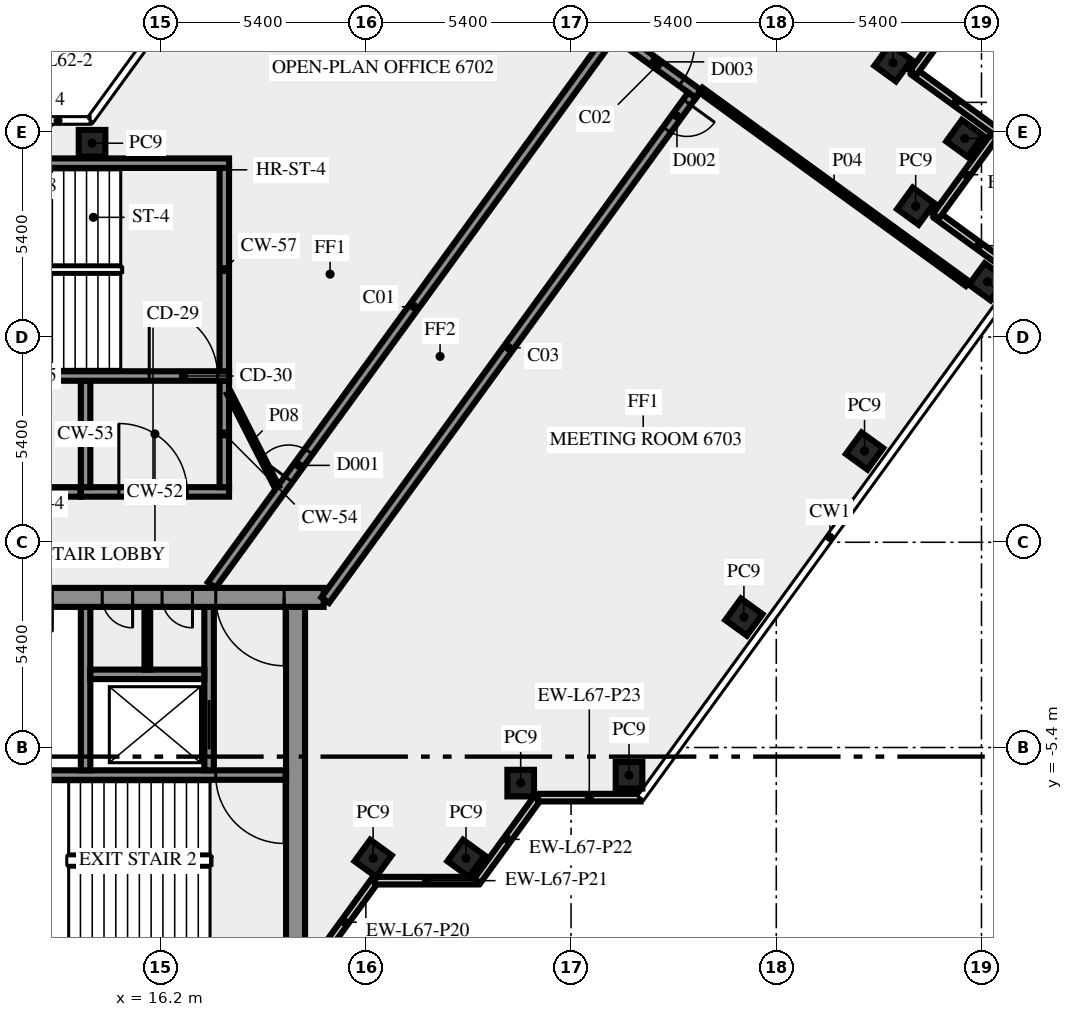
"""IFC4 building model, lengths in metres.
Left out: names, types, materials, properties, quantities, classifications, styles, units other than length and angle.
Written with IfcOpenShell. Run it as: python <this file> out.ifc"""

import sys

from ifc_helpers import new_model, si_unit, direction, frame, frame_2d, origin, origin_2d, place, context, subcontext, project, spatial, rectangle, extrude, element, fill, save


model = new_model("IFC4")
c1 = context("Model", 3, precision=1e-05, world=origin(), true_north=direction((0.0, 1.0)))
c2 = subcontext(c1, "Body", "Model", "MODEL_VIEW")
j1 = project(units=[si_unit("LENGTHUNIT", "METRE"), si_unit("PLANEANGLEUNIT", "RADIAN")], contexts=[c1])
p1 = place(None, origin())
s1 = spatial("IfcSite", under=j1, at=p1, CompositionType="ELEMENT")
p2 = place(p1, origin())
s2 = spatial("IfcBuilding", under=s1, at=p2, CompositionType="ELEMENT")
p3 = place(p2, frame((0.0, 0.0, 289.0)))
s3 = spatial("IfcBuildingStorey", under=s2, at=p3, CompositionType="ELEMENT", Elevation=289.0)
for number, where, z_axis, x_axis in (
    (1, (21.792, -8.315, 0.0), (0.0, 0.0, 1.0), (0.588, 0.809, 0.0)),
    (2, (24.235, -8.315, 0.0), (0.0, 0.0, 1.0), (0.588, 0.809, 0.0)),
    (3, (25.674, -6.337, 0.0), (0.0, 0.0, 1.0), (1.0, 0.0, 0.0)),
    (4, (28.525, -6.13, 0.0), (0.0, 0.0, 1.0), (1.0, 0.0, 0.0)),
    (5, (31.548, -1.969, 0.0), (0.0, 0.0, 1.0), (0.588, 0.809, 0.0)),
    (6, (34.722, 2.4, 0.0), (0.0, 0.0, 1.0), (0.588, 0.809, 0.0)),
    (7, (37.96, 6.855, 0.0), (0.0, 0.0, 1.0), (0.588, 0.809, 0.0)),
    (8, (36.068, 8.844, 0.0), (0.0, 0.0, 1.0), (0.588, 0.809, 0.0)),
    (9, (37.36, 10.625, 0.0), (0.0, 0.0, 1.0), (0.588, 0.809, 0.0)),
    (10, (35.471, 12.616, 0.0), (0.0, 0.0, 1.0), (-0.809, 0.588, 0.0)),
    (11, (14.395, 10.5, 0.0), (0.0, 0.0, 1.0), (-1.0, 0.0, 0.0)),
):
    element("IfcColumn", number, at=place(p3, frame(where, z_axis=z_axis, x_axis=x_axis)), inside=s3, PredefinedType="COLUMN", context=c2, shape_type="SweptSolid", body=[
        extrude(rectangle(XDim=0.7, YDim=0.7, at=origin_2d()), origin(), (0.0, 0.0, 1.0), 3.65),
    ])
p4 = place(p3, frame((20.253, -11.083, 0.0), z_axis=(0.0, 0.0, 1.0), x_axis=(0.587766567315, 0.809030569476, 0.0)))
e12 = element("IfcWall", 12, at=p4, inside=s3, PredefinedType="SOLIDWALL", context=c2, shape_type="SweptSolid", body=[
    extrude(rectangle(XDim=2.688, YDim=0.2, at=frame_2d((1.344, 0.0))), origin(), (0.0, 0.0, 1.0), 3.65),
])
p5 = place(p3, frame((21.843, -8.904, 0.0), z_axis=(0.0, 0.0, 1.0), x_axis=(1.0, 0.0, 0.0)))
e13 = element("IfcWall", 13, at=p5, inside=s3, PredefinedType="SOLIDWALL", context=c2, shape_type="SweptSolid", body=[
    extrude(rectangle(XDim=2.7, YDim=0.2, at=frame_2d((1.35, 0.0))), origin(), (0.0, 0.0, 1.0), 3.65),
])
p6 = place(p3, frame((24.533, -8.909, 0.0), z_axis=(0.0, 0.0, 1.0), x_axis=(0.587720002413, 0.809064397168, 0.0)))
e14 = element("IfcWall", 14, at=p6, inside=s3, PredefinedType="SOLIDWALL", context=c2, shape_type="SweptSolid", body=[
    extrude(rectangle(XDim=2.7, YDim=0.2, at=frame_2d((1.35, 0.0))), origin(), (0.0, 0.0, 1.0), 3.65),
])
for number, where, z_axis, x_axis in (
    (15, (26.13, -6.719, 0.0), (0.0, 0.0, 1.0), (1.0, 0.0, 0.0)),
    (16, (38.814, 7.01, 0.0), (0.0, 0.0, 1.0), (-0.809, 0.588, 0.0)),
    (17, (36.602, 8.58, 0.0), (0.0, 0.0, 1.0), (0.588, 0.809, 0.0)),
    (18, (38.216, 10.782, 0.0), (0.0, 0.0, 1.0), (-0.809, 0.588, 0.0)),
    (19, (36.005, 12.352, 0.0), (0.0, 0.0, 1.0), (0.588, 0.809, 0.0)),
):
    element("IfcWall", number, at=place(p3, frame(where, z_axis=z_axis, x_axis=x_axis)), inside=s3, PredefinedType="SOLIDWALL", context=c2, shape_type="SweptSolid", body=[
        extrude(rectangle(XDim=2.7, YDim=0.2, at=frame_2d((1.35, 0.0))), origin(), (0.0, 0.0, 1.0), 3.65),
    ])
p7 = place(p3, frame((19.75, -10.5, 0.0), z_axis=(0.0, 0.0, 1.0), x_axis=(0.0, 1.0, 0.0)))
e20 = element("IfcWall", 20, at=p7, inside=s3, PredefinedType="SHEAR", context=c2, shape_type="SweptSolid", body=[
    extrude(rectangle(XDim=8.8, YDim=0.5, at=frame_2d((4.4, 0.0))), origin(), (0.0, 0.0, 1.0), 3.65),
])
p8 = place(p3, frame((19.5, -6.125, 0.0), z_axis=(0.0, 0.0, 1.0), x_axis=(-1.0, 0.0, 0.0)))
e21 = element("IfcWall", 21, at=p8, inside=s3, PredefinedType="SHEAR", context=c2, shape_type="SweptSolid", body=[
    extrude(rectangle(XDim=8.05, YDim=0.25, at=frame_2d((4.025, 0.0))), origin(), (0.0, 0.0, 1.0), 3.65),
])
p9 = place(p8, frame((0.05, 0.0, 0.0)))
e22 = element("IfcOpeningElement", 22, at=p9, cuts=e21, PredefinedType="OPENING", context=c2, shape_type="SweptSolid", body=[
    extrude(rectangle(XDim=1.8, YDim=2.1, at=frame_2d((0.9, 1.05))), frame((0.0, 0.135, 0.0), z_axis=(0.0, -1.0, 0.0), x_axis=(1.0, 0.0, 0.0)), (0.0, 0.0, 1.0), 0.27),
])
p10 = place(p3, frame((14.225, -6.0, 0.0), z_axis=(0.0, 0.0, 1.0), x_axis=(0.0, 1.0, 0.0)))
e23 = element("IfcWall", 23, at=p10, inside=s3, PredefinedType="SHEAR", context=c2, shape_type="SweptSolid", body=[
    extrude(rectangle(XDim=4.3, YDim=0.25, at=frame_2d((2.15, 0.0))), origin(), (0.0, 0.0, 1.0), 3.65),
])
p11 = place(p3, frame((17.475, -6.0, 0.0), z_axis=(0.0, 0.0, 1.0), x_axis=(0.0, 1.0, 0.0)))
e24 = element("IfcWall", 24, at=p11, inside=s3, PredefinedType="SHEAR", context=c2, shape_type="SweptSolid", body=[
    extrude(rectangle(XDim=4.3, YDim=0.25, at=frame_2d((2.15, 0.0))), origin(), (0.0, 0.0, 1.0), 3.65),
])
p12 = place(p11, frame((0.55, 0.0, 0.0)))
e25 = element("IfcOpeningElement", 25, at=p12, cuts=e24, PredefinedType="OPENING", context=c2, shape_type="SweptSolid", body=[
    extrude(rectangle(XDim=1.3, YDim=2.1, at=frame_2d((0.65, 1.05))), frame((0.0, 0.135, 0.0), z_axis=(0.0, -1.0, 0.0), x_axis=(1.0, 0.0, 0.0)), (0.0, 0.0, 1.0), 0.27),
])
p13 = place(p3, frame((14.35, -3.475, 0.0), z_axis=(0.0, 0.0, 1.0), x_axis=(1.0, 0.0, 0.0)))
e26 = element("IfcWall", 26, at=p13, inside=s3, PredefinedType="SHEAR", context=c2, shape_type="SweptSolid", body=[
    extrude(rectangle(XDim=3.0, YDim=0.25, at=frame_2d((1.5, 0.0))), origin(), (0.0, 0.0, 1.0), 3.65),
])
p14 = place(p3, frame((15.85, -3.35, 0.0), z_axis=(0.0, 0.0, 1.0), x_axis=(0.0, 1.0, 0.0)))
e27 = element("IfcWall", 27, at=p14, inside=s3, PredefinedType="PARTITIONING", context=c2, shape_type="SweptSolid", body=[
    extrude(rectangle(XDim=1.65, YDim=0.15, at=frame_2d((0.825, 0.0))), origin(), (0.0, 0.0, 1.0), 3.65),
])
p15 = place(p3, frame((20.49, -1.45, 0.0), z_axis=(0.0, 0.0, 1.0), x_axis=(-1.0, 0.0, 0.0)))
e28 = element("IfcWall", 28, at=p15, inside=s3, PredefinedType="SHEAR", context=c2, shape_type="SweptSolid", body=[
    extrude(rectangle(XDim=40.98, YDim=0.5, at=frame_2d((20.49, 0.0))), origin(), (0.0, 0.0, 1.0), 3.65),
])
p16 = place(p15, frame((38.14, 0.0, 0.0)))
e29 = element("IfcOpeningElement", 29, at=p16, cuts=e28, PredefinedType="OPENING", context=c2, shape_type="SweptSolid", body=[
    extrude(rectangle(XDim=1.8, YDim=2.1, at=frame_2d((0.9, 1.05))), frame((0.0, 0.26, 0.0), z_axis=(0.0, -1.0, 0.0), x_axis=(1.0, 0.0, 0.0)), (0.0, 0.0, 1.0), 0.52),
])
p17 = place(p15, frame((35.89, 0.0, 0.0)))
e30 = element("IfcOpeningElement", 30, at=p17, cuts=e28, PredefinedType="OPENING", context=c2, shape_type="SweptSolid", body=[
    extrude(rectangle(XDim=0.9, YDim=2.1, at=frame_2d((0.45, 1.05))), frame((0.0, 0.26, 0.0), z_axis=(0.0, -1.0, 0.0), x_axis=(1.0, 0.0, 0.0)), (0.0, 0.0, 1.0), 0.52),
])
p18 = place(p15, frame((32.94, 0.0, 0.0)))
e31 = element("IfcOpeningElement", 31, at=p18, cuts=e28, PredefinedType="OPENING", context=c2, shape_type="SweptSolid", body=[
    extrude(rectangle(XDim=0.9, YDim=2.1, at=frame_2d((0.45, 1.05))), frame((0.0, 0.26, 0.0), z_axis=(0.0, -1.0, 0.0), x_axis=(1.0, 0.0, 0.0)), (0.0, 0.0, 1.0), 0.52),
])
p19 = place(p15, frame((31.015, 0.0, 0.0)))
e32 = element("IfcOpeningElement", 32, at=p19, cuts=e28, PredefinedType="OPENING", context=c2, shape_type="SweptSolid", body=[
    extrude(rectangle(XDim=0.8, YDim=2.1, at=frame_2d((0.4, 1.05))), frame((0.0, 0.26, 0.0), z_axis=(0.0, -1.0, 0.0), x_axis=(1.0, 0.0, 0.0)), (0.0, 0.0, 1.0), 0.52),
])
p20 = place(p15, frame((24.765, 0.0, 0.0)))
e33 = element("IfcOpeningElement", 33, at=p20, cuts=e28, PredefinedType="OPENING", context=c2, shape_type="SweptSolid", body=[
    extrude(rectangle(XDim=0.8, YDim=2.1, at=frame_2d((0.4, 1.05))), frame((0.0, 0.26, 0.0), z_axis=(0.0, -1.0, 0.0), x_axis=(1.0, 0.0, 0.0)), (0.0, 0.0, 1.0), 0.52),
])
p21 = place(p15, frame((21.765, 0.0, 0.0)))
e34 = element("IfcOpeningElement", 34, at=p21, cuts=e28, PredefinedType="OPENING", context=c2, shape_type="SweptSolid", body=[
    extrude(rectangle(XDim=2.0, YDim=2.1, at=frame_2d((1.0, 1.05))), frame((0.0, 0.26, 0.0), z_axis=(0.0, -1.0, 0.0), x_axis=(1.0, 0.0, 0.0)), (0.0, 0.0, 1.0), 0.52),
])
p22 = place(p15, frame((15.202, 0.0, 0.0)))
e35 = element("IfcOpeningElement", 35, at=p22, cuts=e28, PredefinedType="OPENING", context=c2, shape_type="SweptSolid", body=[
    extrude(rectangle(XDim=0.9, YDim=2.1, at=frame_2d((0.45, 1.05))), frame((0.0, 0.26, 0.0), z_axis=(0.0, -1.0, 0.0), x_axis=(1.0, 0.0, 0.0)), (0.0, 0.0, 1.0), 0.52),
])
p23 = place(p15, frame((13.54, 0.0, 0.0)))
e36 = element("IfcOpeningElement", 36, at=p23, cuts=e28, PredefinedType="OPENING", context=c2, shape_type="SweptSolid", body=[
    extrude(rectangle(XDim=0.9, YDim=2.1, at=frame_2d((0.45, 1.05))), frame((0.0, 0.26, 0.0), z_axis=(0.0, -1.0, 0.0), x_axis=(1.0, 0.0, 0.0)), (0.0, 0.0, 1.0), 0.52),
])
p24 = place(p15, frame((11.64, 0.0, 0.0)))
e37 = element("IfcOpeningElement", 37, at=p24, cuts=e28, PredefinedType="OPENING", context=c2, shape_type="SweptSolid", body=[
    extrude(rectangle(XDim=0.9, YDim=2.1, at=frame_2d((0.45, 1.05))), frame((0.0, 0.26, 0.0), z_axis=(0.0, -1.0, 0.0), x_axis=(1.0, 0.0, 0.0)), (0.0, 0.0, 1.0), 0.52),
])
p25 = place(p15, frame((9.577, 0.0, 0.0)))
e38 = element("IfcOpeningElement", 38, at=p25, cuts=e28, PredefinedType="OPENING", context=c2, shape_type="SweptSolid", body=[
    extrude(rectangle(XDim=0.9, YDim=2.1, at=frame_2d((0.45, 1.05))), frame((0.0, 0.26, 0.0), z_axis=(0.0, -1.0, 0.0), x_axis=(1.0, 0.0, 0.0)), (0.0, 0.0, 1.0), 0.52),
])
p26 = place(p15, frame((7.14, 0.0, 0.0)))
e39 = element("IfcOpeningElement", 39, at=p26, cuts=e28, PredefinedType="OPENING", context=c2, shape_type="SweptSolid", body=[
    extrude(rectangle(XDim=0.9, YDim=2.1, at=frame_2d((0.45, 1.05))), frame((0.0, 0.26, 0.0), z_axis=(0.0, -1.0, 0.0), x_axis=(1.0, 0.0, 0.0)), (0.0, 0.0, 1.0), 0.52),
])
p27 = place(p15, frame((5.028, 0.0, 0.0)))
e40 = element("IfcOpeningElement", 40, at=p27, cuts=e28, PredefinedType="OPENING", context=c2, shape_type="SweptSolid", body=[
    extrude(rectangle(XDim=0.8, YDim=2.1, at=frame_2d((0.4, 1.05))), frame((0.0, 0.26, 0.0), z_axis=(0.0, -1.0, 0.0), x_axis=(1.0, 0.0, 0.0)), (0.0, 0.0, 1.0), 0.52),
])
p28 = place(p15, frame((3.452, 0.0, 0.0)))
e41 = element("IfcOpeningElement", 41, at=p28, cuts=e28, PredefinedType="OPENING", context=c2, shape_type="SweptSolid", body=[
    extrude(rectangle(XDim=0.8, YDim=2.1, at=frame_2d((0.4, 1.05))), frame((0.0, 0.26, 0.0), z_axis=(0.0, -1.0, 0.0), x_axis=(1.0, 0.0, 0.0)), (0.0, 0.0, 1.0), 0.52),
])
p29 = place(p15, frame((1.04, 0.0, 0.0)))
e42 = element("IfcOpeningElement", 42, at=p29, cuts=e28, PredefinedType="OPENING", context=c2, shape_type="SweptSolid", body=[
    extrude(rectangle(XDim=1.8, YDim=2.1, at=frame_2d((0.9, 1.05))), frame((0.0, 0.26, 0.0), z_axis=(0.0, -1.0, 0.0), x_axis=(1.0, 0.0, 0.0)), (0.0, 0.0, 1.0), 0.52),
])
p30 = place(p3, frame((14.1, 1.325, 0.0), z_axis=(0.0, 0.0, 1.0), x_axis=(1.0, 0.0, 0.0)))
e43 = element("IfcWall", 43, at=p30, inside=s3, PredefinedType="SHEAR", context=c2, shape_type="SweptSolid", body=[
    extrude(rectangle(XDim=3.9, YDim=0.25, at=frame_2d((1.95, 0.0))), origin(), (0.0, 0.0, 1.0), 3.65),
])
p31 = place(p30, frame((1.0, 0.0, 0.0)))
e44 = element("IfcOpeningElement", 44, at=p31, cuts=e43, PredefinedType="OPENING", context=c2, shape_type="SweptSolid", body=[
    extrude(rectangle(XDim=1.8, YDim=2.1, at=frame_2d((0.9, 1.05))), frame((0.0, 0.135, 0.0), z_axis=(0.0, -1.0, 0.0), x_axis=(1.0, 0.0, 0.0)), (0.0, 0.0, 1.0), 0.27),
])
for number, where, z_axis, x_axis in (
    (45, (14.225, 1.45, 0.0), (0.0, 0.0, 1.0), (0.0, 1.0, 0.0)),
    (46, (17.875, 1.45, 0.0), (0.0, 0.0, 1.0), (0.0, 1.0, 0.0)),
):
    element("IfcWall", number, at=place(p3, frame(where, z_axis=z_axis, x_axis=x_axis)), inside=s3, PredefinedType="SHEAR", context=c2, shape_type="SweptSolid", body=[
        extrude(rectangle(XDim=2.8, YDim=0.25, at=frame_2d((1.4, 0.0))), origin(), (0.0, 0.0, 1.0), 3.65),
    ])
p32 = place(p3, frame((7.5, 4.375, 0.0), z_axis=(0.0, 0.0, 1.0), x_axis=(1.0, 0.0, 0.0)))
e47 = element("IfcWall", 47, at=p32, inside=s3, PredefinedType="SHEAR", context=c2, shape_type="SweptSolid", body=[
    extrude(rectangle(XDim=10.5, YDim=0.25, at=frame_2d((5.25, 0.0))), origin(), (0.0, 0.0, 1.0), 3.65),
])
p33 = place(p32, frame((8.4, 0.0, 0.0)))
e48 = element("IfcOpeningElement", 48, at=p33, cuts=e47, PredefinedType="OPENING", context=c2, shape_type="SweptSolid", body=[
    extrude(rectangle(XDim=1.8, YDim=2.1, at=frame_2d((0.9, 1.05))), frame((0.0, 0.135, 0.0), z_axis=(0.0, -1.0, 0.0), x_axis=(1.0, 0.0, 0.0)), (0.0, 0.0, 1.0), 0.27),
])
p34 = place(p3, frame((17.875, 4.5, 0.0), z_axis=(0.0, 0.0, 1.0), x_axis=(0.0, 1.0, 0.0)))
e49 = element("IfcWall", 49, at=p34, inside=s3, PredefinedType="SHEAR", context=c2, shape_type="SweptSolid", body=[
    extrude(rectangle(XDim=5.35, YDim=0.25, at=frame_2d((2.675, 0.0))), origin(), (0.0, 0.0, 1.0), 3.65),
])
p35 = place(p3, frame((7.5, 9.975, 0.0), z_axis=(0.0, 0.0, 1.0), x_axis=(1.0, 0.0, 0.0)))
e50 = element("IfcWall", 50, at=p35, inside=s3, PredefinedType="SHEAR", context=c2, shape_type="SweptSolid", body=[
    extrude(rectangle(XDim=10.5, YDim=0.25, at=frame_2d((5.25, 0.0))), origin(), (0.0, 0.0, 1.0), 3.65),
])
p36 = place(p35, frame((2.0, 0.0, 1.0)))
e51 = element("IfcOpeningElement", 51, at=p36, cuts=e50, PredefinedType="OPENING", context=c2, shape_type="SweptSolid", body=[
    extrude(rectangle(XDim=1.2, YDim=1.2, at=frame_2d((0.6, 0.6))), frame((0.0, 0.135, 0.0), z_axis=(0.0, -1.0, 0.0), x_axis=(1.0, 0.0, 0.0)), (0.0, 0.0, 1.0), 0.27),
])
p37 = place(p3, frame((17.545, -1.125, 0.0), z_axis=(0.0, 0.0, 1.0), x_axis=(0.58779555165, 0.809009511354, 0.0)))
e52 = element("IfcWall", 52, at=p37, inside=s3, PredefinedType="SOLIDWALL", context=c2, shape_type="SweptSolid", body=[
    extrude(rectangle(XDim=18.103, YDim=0.25, at=frame_2d((9.052, 0.0))), origin(), (0.0, 0.0, 1.0), 3.65),
])
p38 = place(p37, frame((3.441, 0.0, 0.0)))
e53 = element("IfcOpeningElement", 53, at=p38, cuts=e52, PredefinedType="OPENING", context=c2, shape_type="SweptSolid", body=[
    extrude(rectangle(XDim=0.9, YDim=2.1, at=frame_2d((0.45, 1.05))), frame((0.0, 0.135, 0.0), z_axis=(0.0, -1.0, 0.0), x_axis=(1.0, 0.0, 0.0)), (0.0, 0.0, 1.0), 0.27),
])
p39 = place(p3, frame((28.213, 13.346, 0.0), z_axis=(0.0, 0.0, 1.0), x_axis=(0.809006914995, -0.587799125119, 0.0)))
e54 = element("IfcWall", 54, at=p39, inside=s3, PredefinedType="SOLIDWALL", context=c2, shape_type="SweptSolid", body=[
    extrude(rectangle(XDim=2.65, YDim=0.25, at=frame_2d((1.325, 0.0))), origin(), (0.0, 0.0, 1.0), 3.65),
])
p40 = place(p39, frame((0.3, 0.0, 0.0)))
e55 = element("IfcOpeningElement", 55, at=p40, cuts=e54, PredefinedType="OPENING", context=c2, shape_type="SweptSolid", body=[
    extrude(rectangle(XDim=1.8, YDim=2.1, at=frame_2d((0.9, 1.05))), frame((0.0, 0.135, 0.0), z_axis=(0.0, -1.0, 0.0), x_axis=(1.0, 0.0, 0.0)), (0.0, 0.0, 1.0), 0.27),
])
p41 = place(p3, frame((30.183, 11.761, 0.0), z_axis=(0.0, 0.0, 1.0), x_axis=(-0.587781762867, -0.80901952958, 0.0)))
e56 = element("IfcWall", 56, at=p41, inside=s3, PredefinedType="SOLIDWALL", context=c2, shape_type="SweptSolid", body=[
    extrude(rectangle(XDim=16.42, YDim=0.25, at=frame_2d((8.21, 0.0))), origin(), (0.0, 0.0, 1.0), 3.65),
])
p42 = place(p41, frame((0.225, 0.0, 0.0)))
e57 = element("IfcOpeningElement", 57, at=p42, cuts=e56, PredefinedType="OPENING", context=c2, shape_type="SweptSolid", body=[
    extrude(rectangle(XDim=0.9, YDim=2.1, at=frame_2d((0.45, 1.05))), frame((0.0, 0.135, 0.0), z_axis=(0.0, -1.0, 0.0), x_axis=(1.0, 0.0, 0.0)), (0.0, 0.0, 1.0), 0.27),
])
p43 = place(p3, frame((-5.246, 1.325, 0.0), z_axis=(0.0, 0.0, 1.0), x_axis=(1.0, 0.0, 0.0)))
e58 = element("IfcWall", 58, at=p43, inside=s3, PredefinedType="SOLIDWALL", context=c2, shape_type="SweptSolid", body=[
    extrude(rectangle(XDim=19.336, YDim=0.25, at=frame_2d((9.668, 0.0))), origin(), (0.0, 0.0, 1.0), 3.65),
])
p44 = place(p43, frame((11.194, 0.0, 0.0)))
e59 = element("IfcOpeningElement", 59, at=p44, cuts=e58, PredefinedType="OPENING", context=c2, shape_type="SweptSolid", body=[
    extrude(rectangle(XDim=0.9, YDim=2.1, at=frame_2d((0.45, 1.05))), frame((0.0, 0.135, 0.0), z_axis=(0.0, -1.0, 0.0), x_axis=(1.0, 0.0, 0.0)), (0.0, 0.0, 1.0), 0.27),
])
p45 = place(p43, frame((12.794, 0.0, 0.0)))
e60 = element("IfcOpeningElement", 60, at=p45, cuts=e58, PredefinedType="OPENING", context=c2, shape_type="SweptSolid", body=[
    extrude(rectangle(XDim=0.9, YDim=2.1, at=frame_2d((0.45, 1.05))), frame((0.0, 0.135, 0.0), z_axis=(0.0, -1.0, 0.0), x_axis=(1.0, 0.0, 0.0)), (0.0, 0.0, 1.0), 0.27),
])
p46 = place(p3, frame((30.415, 11.902, 0.0), z_axis=(0.0, 0.0, 1.0), x_axis=(0.809020922653, -0.587779845444, 0.0)))
e61 = element("IfcWall", 61, at=p46, inside=s3, PredefinedType="PARTITIONING", context=c2, shape_type="SweptSolid", body=[
    extrude(rectangle(XDim=8.67, YDim=0.15, at=frame_2d((4.335, 0.0))), origin(), (0.0, 0.0, 1.0), 3.65),
])
p47 = place(p3, frame((18.0, 3.925, 0.0), z_axis=(0.0, 0.0, 1.0), x_axis=(0.453950796792, -0.891026752736, 0.0)))
e62 = element("IfcWall", 62, at=p47, inside=s3, PredefinedType="PARTITIONING", context=c2, shape_type="SweptSolid", body=[
    extrude(rectangle(XDim=2.778, YDim=0.12, at=frame_2d((1.389, 0.0))), origin(), (0.0, 0.0, 1.0), 3.65),
])
p48 = place(p9, origin())
e63 = element("IfcDoor", 63, at=p48, inside=s3, OperationType="DOUBLE_DOOR_SINGLE_SWING", PredefinedType="DOOR", context=c2, shape_type="SweptSolid", body=[
    extrude(rectangle(XDim=1.8, YDim=2.1, at=frame_2d((0.9, 1.05))), frame((0.0, 0.025, 0.0), z_axis=(0.0, -1.0, 0.0), x_axis=(1.0, 0.0, 0.0)), (0.0, 0.0, 1.0), 0.05),
])
fill(e22, e63)
p49 = place(p12, origin())
e64 = element("IfcDoor", 64, at=p49, inside=s3, OperationType="DOUBLE_DOOR_SLIDING", PredefinedType="DOOR", context=c2, shape_type="SweptSolid", body=[
    extrude(rectangle(XDim=1.3, YDim=2.1, at=frame_2d((0.65, 1.05))), frame((0.0, 0.025, 0.0), z_axis=(0.0, -1.0, 0.0), x_axis=(1.0, 0.0, 0.0)), (0.0, 0.0, 1.0), 0.05),
])
fill(e25, e64)
p50 = place(p27, origin())
e65 = element("IfcDoor", 65, at=p50, inside=s3, OperationType="SINGLE_SWING_LEFT", PredefinedType="DOOR", context=c2, shape_type="SweptSolid", body=[
    extrude(rectangle(XDim=0.8, YDim=2.1, at=frame_2d((0.4, 1.05))), frame((0.0, 0.025, 0.0), z_axis=(0.0, -1.0, 0.0), x_axis=(1.0, 0.0, 0.0)), (0.0, 0.0, 1.0), 0.05),
])
fill(e40, e65)
p51 = place(p28, origin())
e66 = element("IfcDoor", 66, at=p51, inside=s3, OperationType="SINGLE_SWING_LEFT", PredefinedType="DOOR", context=c2, shape_type="SweptSolid", body=[
    extrude(rectangle(XDim=0.8, YDim=2.1, at=frame_2d((0.4, 1.05))), frame((0.0, 0.025, 0.0), z_axis=(0.0, -1.0, 0.0), x_axis=(1.0, 0.0, 0.0)), (0.0, 0.0, 1.0), 0.05),
])
fill(e41, e66)
p52 = place(p29, origin())
e67 = element("IfcDoor", 67, at=p52, inside=s3, OperationType="DOUBLE_DOOR_SINGLE_SWING", PredefinedType="DOOR", context=c2, shape_type="SweptSolid", body=[
    extrude(rectangle(XDim=1.8, YDim=2.1, at=frame_2d((0.9, 1.05))), frame((0.0, 0.025, 0.0), z_axis=(0.0, -1.0, 0.0), x_axis=(1.0, 0.0, 0.0)), (0.0, 0.0, 1.0), 0.05),
])
fill(e42, e67)
p53 = place(p31, origin())
e68 = element("IfcDoor", 68, at=p53, inside=s3, OperationType="DOUBLE_DOOR_SINGLE_SWING", PredefinedType="DOOR", context=c2, shape_type="SweptSolid", body=[
    extrude(rectangle(XDim=1.8, YDim=2.1, at=frame_2d((0.9, 1.05))), frame((0.0, 0.025, 0.0), z_axis=(0.0, -1.0, 0.0), x_axis=(1.0, 0.0, 0.0)), (0.0, 0.0, 1.0), 0.05),
])
fill(e44, e68)
p54 = place(p33, origin())
e69 = element("IfcDoor", 69, at=p54, inside=s3, OperationType="DOUBLE_DOOR_SINGLE_SWING", PredefinedType="DOOR", context=c2, shape_type="SweptSolid", body=[
    extrude(rectangle(XDim=1.8, YDim=2.1, at=frame_2d((0.9, 1.05))), frame((0.0, 0.025, 0.0), z_axis=(0.0, -1.0, 0.0), x_axis=(1.0, 0.0, 0.0)), (0.0, 0.0, 1.0), 0.05),
])
fill(e48, e69)
p55 = place(p38, origin())
e70 = element("IfcDoor", 70, at=p55, inside=s3, OperationType="SINGLE_SWING_LEFT", PredefinedType="DOOR", context=c2, shape_type="SweptSolid", body=[
    extrude(rectangle(XDim=0.9, YDim=2.1, at=frame_2d((0.45, 1.05))), frame((0.0, 0.025, 0.0), z_axis=(0.0, -1.0, 0.0), x_axis=(1.0, 0.0, 0.0)), (0.0, 0.0, 1.0), 0.05),
])
fill(e53, e70)
p56 = place(p40, origin())
e71 = element("IfcDoor", 71, at=p56, inside=s3, OperationType="DOUBLE_DOOR_SINGLE_SWING", PredefinedType="DOOR", context=c2, shape_type="SweptSolid", body=[
    extrude(rectangle(XDim=1.8, YDim=2.1, at=frame_2d((0.9, 1.05))), frame((0.0, 0.025, 0.0), z_axis=(0.0, -1.0, 0.0), x_axis=(1.0, 0.0, 0.0)), (0.0, 0.0, 1.0), 0.05),
])
fill(e55, e71)
p57 = place(p42, origin())
e72 = element("IfcDoor", 72, at=p57, inside=s3, OperationType="SINGLE_SWING_LEFT", PredefinedType="DOOR", context=c2, shape_type="SweptSolid", body=[
    extrude(rectangle(XDim=0.9, YDim=2.1, at=frame_2d((0.45, 1.05))), frame((0.0, 0.025, 0.0), z_axis=(0.0, -1.0, 0.0), x_axis=(1.0, 0.0, 0.0)), (0.0, 0.0, 1.0), 0.05),
])
fill(e57, e72)
save(model, sys.argv[1])
